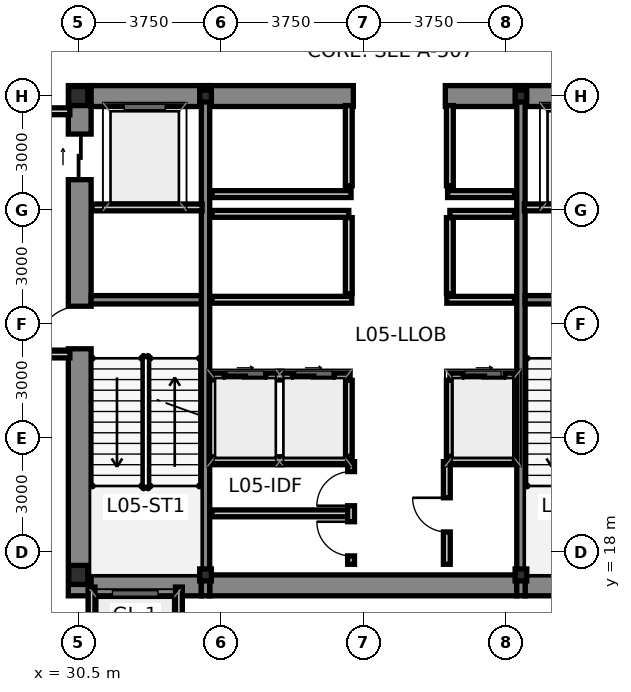
"""IFC4 building model, lengths in metres.
Left out: names, types, materials, properties, quantities, classifications, styles, units other than length and angle.
Written with IfcOpenShell. Run it as: python <this file> out.ifc"""

import sys

from ifc_helpers import new_model, si_unit, direction, frame, frame_2d, origin, origin_2d, place, context, subcontext, project, spatial, rectangle, i_section, extrude, source, transform, mapped, element, fill, save


model = new_model("IFC4")
c1 = context("Model", 3, precision=1e-05, world=origin(), true_north=direction((0.0, 1.0)))
c2 = subcontext(c1, "Body", "Model", "MODEL_VIEW")
j1 = project(units=[si_unit("LENGTHUNIT", "METRE"), si_unit("PLANEANGLEUNIT", "RADIAN")], contexts=[c1])
p1 = place(None, origin())
s1 = spatial("IfcSite", under=j1, at=p1, CompositionType="ELEMENT")
p2 = place(p1, origin())
s2 = spatial("IfcBuilding", under=s1, at=p2, CompositionType="ELEMENT")
p3 = place(p2, frame((0.0, 0.0, 23.1)))
s3 = spatial("IfcBuildingStorey", under=s2, at=p3, CompositionType="ELEMENT", Elevation=23.1)
m1 = source(origin(), c2, "Body", "SweptSolid", [
    extrude(i_section(OverallWidth=0.5, OverallDepth=0.5, WebThickness=0.028, FlangeThickness=0.04, at=origin_2d()), origin(), (0.0, 0.0, 1.0), 4.5),
])
for number, where, z_axis, x_axis in (
    (1, (30.5, 17.4, 0.0), (0.0, 0.0, 1.0), (1.0, 0.0, 0.0)),
    (2, (30.5, 30.0, 0.0), (0.0, 0.0, 1.0), (1.0, 0.0, 0.0)),
):
    element("IfcColumn", number, at=place(p3, frame(where, z_axis=z_axis, x_axis=x_axis)), inside=s3, PredefinedType="COLUMN", context=c2, shape_type="MappedRepresentation", body=[
        mapped(m1, transform((0.0, 0.0, 0.0), scale=1.0)),
    ])
m2 = source(origin(), c2, "Body", "SweptSolid", [
    extrude(i_section(OverallWidth=0.307, OverallDepth=0.315, WebThickness=0.012, FlangeThickness=0.019, at=origin_2d()), origin(), (0.0, 0.0, 1.0), 4.5),
])
for number, where, z_axis, x_axis in (
    (3, (33.85, 17.4, 0.0), (0.0, 0.0, 1.0), (1.0, 0.0, 0.0)),
    (4, (42.15, 17.4, 0.0), (0.0, 0.0, 1.0), (1.0, 0.0, 0.0)),
    (5, (33.85, 30.0, 0.0), (0.0, 0.0, 1.0), (1.0, 0.0, 0.0)),
    (6, (42.15, 30.0, 0.0), (0.0, 0.0, 1.0), (1.0, 0.0, 0.0)),
):
    element("IfcColumn", number, at=place(p3, frame(where, z_axis=z_axis, x_axis=x_axis)), inside=s3, PredefinedType="COLUMN", context=c2, shape_type="MappedRepresentation", body=[
        mapped(m2, transform((0.0, 0.0, 0.0), scale=1.0)),
    ])
p4 = place(p3, frame((30.54, 16.85, 0.0), z_axis=(0.0, 0.0, 1.0), x_axis=(0.0, 1.0, 0.0)))
e7 = element("IfcWall", 7, at=p4, inside=s3, PredefinedType="SHEAR", context=c2, shape_type="SweptSolid", body=[
    extrude(rectangle(XDim=13.425, YDim=0.6, at=frame_2d((6.712, 0.0))), origin(), (0.0, 0.0, 1.0), 4.5),
])
p5 = place(p4, frame((6.5, 0.0, 0.0)))
e8 = element("IfcOpeningElement", 8, at=p5, cuts=e7, PredefinedType="OPENING", context=c2, shape_type="SweptSolid", body=[
    extrude(rectangle(XDim=1.12, YDim=2.15, at=frame_2d((0.56, 1.075))), frame((0.0, 0.312, 0.0), z_axis=(0.0, -1.0, 0.0), x_axis=(1.0, 0.0, 0.0)), (0.0, 0.0, 1.0), 0.624),
])
p6 = place(p4, frame((10.95, 0.0, 0.0)))
e9 = element("IfcOpeningElement", 9, at=p6, cuts=e7, PredefinedType="OPENING", context=c2, shape_type="SweptSolid", body=[
    extrude(rectangle(XDim=1.2, YDim=2.2, at=frame_2d((0.6, 1.1))), frame((0.0, 0.312, 0.0), z_axis=(0.0, -1.0, 0.0), x_axis=(1.0, 0.0, 0.0)), (0.0, 0.0, 1.0), 0.624),
])
p7 = place(p3, frame((30.84, 17.125, 0.0), z_axis=(0.0, 0.0, 1.0), x_axis=(1.0, 0.0, 0.0)))
e10 = element("IfcWall", 10, at=p7, inside=s3, PredefinedType="SHEAR", context=c2, shape_type="SweptSolid", body=[
    extrude(rectangle(XDim=2.9, YDim=0.55, at=frame_2d((1.45, 0.0))), origin(), (0.0, 0.0, 1.0), 4.5),
])
p8 = place(p3, frame((33.96, 17.125, 0.0), z_axis=(0.0, 0.0, 1.0), x_axis=(1.0, 0.0, 0.0)))
e11 = element("IfcWall", 11, at=p8, inside=s3, PredefinedType="SHEAR", context=c2, shape_type="SweptSolid", body=[
    extrude(rectangle(XDim=8.08, YDim=0.55, at=frame_2d((4.04, 0.0))), origin(), (0.0, 0.0, 1.0), 4.5),
])
for number, where, z_axis, x_axis in (
    (12, (42.26, 17.125, 0.0), (0.0, 0.0, 1.0), (1.0, 0.0, 0.0)),
    (13, (30.84, 30.0, 0.0), (0.0, 0.0, 1.0), (1.0, 0.0, 0.0)),
):
    element("IfcWall", number, at=place(p3, frame(where, z_axis=z_axis, x_axis=x_axis)), inside=s3, PredefinedType="SHEAR", context=c2, shape_type="SweptSolid", body=[
        extrude(rectangle(XDim=2.9, YDim=0.55, at=frame_2d((1.45, 0.0))), origin(), (0.0, 0.0, 1.0), 4.5),
    ])
p9 = place(p3, frame((33.96, 30.0, 0.0), z_axis=(0.0, 0.0, 1.0), x_axis=(1.0, 0.0, 0.0)))
e14 = element("IfcWall", 14, at=p9, inside=s3, PredefinedType="SHEAR", context=c2, shape_type="SweptSolid", body=[
    extrude(rectangle(XDim=3.78, YDim=0.55, at=frame_2d((1.89, 0.0))), origin(), (0.0, 0.0, 1.0), 4.5),
])
p10 = place(p3, frame((40.16, 30.0, 0.0), z_axis=(0.0, 0.0, 1.0), x_axis=(1.0, 0.0, 0.0)))
e15 = element("IfcWall", 15, at=p10, inside=s3, PredefinedType="SHEAR", context=c2, shape_type="SweptSolid", body=[
    extrude(rectangle(XDim=1.88, YDim=0.55, at=frame_2d((0.94, 0.0))), origin(), (0.0, 0.0, 1.0), 4.5),
])
p11 = place(p3, frame((42.26, 30.0, 0.0), z_axis=(0.0, 0.0, 1.0), x_axis=(1.0, 0.0, 0.0)))
e16 = element("IfcWall", 16, at=p11, inside=s3, PredefinedType="SHEAR", context=c2, shape_type="SweptSolid", body=[
    extrude(rectangle(XDim=2.9, YDim=0.55, at=frame_2d((1.45, 0.0))), origin(), (0.0, 0.0, 1.0), 4.5),
])
for number, where, z_axis, x_axis in (
    (17, (33.85, 16.85, 0.0), (0.0, 0.0, 1.0), (0.0, 1.0, 0.0)),
    (18, (42.15, 16.85, 0.0), (0.0, 0.0, 1.0), (0.0, 1.0, 0.0)),
):
    element("IfcWall", number, at=place(p3, frame(where, z_axis=z_axis, x_axis=x_axis)), inside=s3, PredefinedType="SHEAR", context=c2, shape_type="SweptSolid", body=[
        extrude(rectangle(XDim=13.425, YDim=0.22, at=frame_2d((6.712, 0.0))), origin(), (0.0, 0.0, 1.0), 4.5),
    ])
for number, where, z_axis, x_axis in (
    (19, (30.84, 24.64, 0.0), (0.0, 0.0, 1.0), (1.0, 0.0, 0.0)),
    (20, (42.26, 24.64, 0.0), (0.0, 0.0, 1.0), (1.0, 0.0, 0.0)),
):
    element("IfcWall", number, at=place(p3, frame(where, z_axis=z_axis, x_axis=x_axis)), inside=s3, PredefinedType="SHEAR", context=c2, shape_type="SweptSolid", body=[
        extrude(rectangle(XDim=2.9, YDim=0.22, at=frame_2d((1.45, 0.0))), origin(), (0.0, 0.0, 1.0), 4.5),
    ])
p12 = place(p3, frame((30.85, 14.42, 0.0), z_axis=(0.0, 0.0, 1.0), x_axis=(0.0, 1.0, 0.0)))
e21 = element("IfcWall", 21, at=p12, inside=s3, PredefinedType="PARTITIONING", context=c2, shape_type="SweptSolid", body=[
    extrude(rectangle(XDim=2.66, YDim=0.18, at=frame_2d((1.33, 0.0))), origin(), (0.0, 0.0, 1.0), 3.623),
])
p13 = place(p3, frame((33.15, 14.42, 0.0), z_axis=(0.0, 0.0, 1.0), x_axis=(0.0, 1.0, 0.0)))
e22 = element("IfcWall", 22, at=p13, inside=s3, PredefinedType="PARTITIONING", context=c2, shape_type="SweptSolid", body=[
    extrude(rectangle(XDim=2.66, YDim=0.18, at=frame_2d((1.33, 0.0))), origin(), (0.0, 0.0, 1.0), 4.25),
])
p14 = place(p3, frame((34.02, 22.62, 0.0), z_axis=(0.0, 0.0, 1.0), x_axis=(1.0, 0.0, 0.0)))
e23 = element("IfcWall", 23, at=p14, inside=s3, PredefinedType="PARTITIONING", context=c2, shape_type="SweptSolid", body=[
    extrude(rectangle(XDim=3.6, YDim=0.18, at=frame_2d((1.8, 0.0))), origin(), (0.0, 0.0, 1.0), 4.25),
])
p15 = place(p14, frame((0.32, 0.0, 0.0)))
e24 = element("IfcOpeningElement", 24, at=p15, cuts=e23, PredefinedType="OPENING", context=c2, shape_type="SweptSolid", body=[
    extrude(rectangle(XDim=1.1, YDim=2.2, at=frame_2d((0.55, 1.1))), frame((0.0, 0.102, 0.0), z_axis=(0.0, -1.0, 0.0), x_axis=(1.0, 0.0, 0.0)), (0.0, 0.0, 1.0), 0.204),
])
p16 = place(p14, frame((2.12, 0.0, 0.0)))
e25 = element("IfcOpeningElement", 25, at=p16, cuts=e23, PredefinedType="OPENING", context=c2, shape_type="SweptSolid", body=[
    extrude(rectangle(XDim=1.1, YDim=2.2, at=frame_2d((0.55, 1.1))), frame((0.0, 0.102, 0.0), z_axis=(0.0, -1.0, 0.0), x_axis=(1.0, 0.0, 0.0)), (0.0, 0.0, 1.0), 0.204),
])
p17 = place(p3, frame((40.28, 22.62, 0.0), z_axis=(0.0, 0.0, 1.0), x_axis=(1.0, 0.0, 0.0)))
e26 = element("IfcWall", 26, at=p17, inside=s3, PredefinedType="PARTITIONING", context=c2, shape_type="SweptSolid", body=[
    extrude(rectangle(XDim=1.7, YDim=0.18, at=frame_2d((0.85, 0.0))), origin(), (0.0, 0.0, 1.0), 4.25),
])
p18 = place(p17, frame((0.35, 0.0, 0.0)))
e27 = element("IfcOpeningElement", 27, at=p18, cuts=e26, PredefinedType="OPENING", context=c2, shape_type="SweptSolid", body=[
    extrude(rectangle(XDim=1.1, YDim=2.2, at=frame_2d((0.55, 1.1))), frame((0.0, 0.102, 0.0), z_axis=(0.0, -1.0, 0.0), x_axis=(1.0, 0.0, 0.0)), (0.0, 0.0, 1.0), 0.204),
])
for number, where, z_axis, x_axis in (
    (28, (37.62, 20.52, 0.0), (0.0, 0.0, 1.0), (0.0, 1.0, 0.0)),
    (29, (40.28, 20.52, 0.0), (0.0, 0.0, 1.0), (0.0, 1.0, 0.0)),
):
    element("IfcWall", number, at=place(p3, frame(where, z_axis=z_axis, x_axis=x_axis)), inside=s3, PredefinedType="PARTITIONING", context=c2, shape_type="SweptSolid", body=[
        extrude(rectangle(XDim=2.0, YDim=0.18, at=frame_2d((1.0, 0.0))), origin(), (0.0, 0.0, 1.0), 4.25),
    ])
p19 = place(p3, frame((34.02, 26.9, 0.0), z_axis=(0.0, 0.0, 1.0), x_axis=(1.0, 0.0, 0.0)))
e30 = element("IfcWall", 30, at=p19, inside=s3, PredefinedType="PARTITIONING", context=c2, shape_type="SweptSolid", body=[
    extrude(rectangle(XDim=3.6, YDim=0.18, at=frame_2d((1.8, 0.0))), origin(), (0.0, 0.0, 1.0), 4.25),
])
p20 = place(p3, frame((40.28, 26.9, 0.0), z_axis=(0.0, 0.0, 1.0), x_axis=(1.0, 0.0, 0.0)))
e31 = element("IfcWall", 31, at=p20, inside=s3, PredefinedType="PARTITIONING", context=c2, shape_type="SweptSolid", body=[
    extrude(rectangle(XDim=1.7, YDim=0.18, at=frame_2d((0.85, 0.0))), origin(), (0.0, 0.0, 1.0), 4.25),
])
for number, where, z_axis, x_axis in (
    (32, (37.62, 24.8, 0.0), (0.0, 0.0, 1.0), (0.0, 1.0, 0.0)),
    (33, (40.28, 24.8, 0.0), (0.0, 0.0, 1.0), (0.0, 1.0, 0.0)),
):
    element("IfcWall", number, at=place(p3, frame(where, z_axis=z_axis, x_axis=x_axis)), inside=s3, PredefinedType="PARTITIONING", context=c2, shape_type="SweptSolid", body=[
        extrude(rectangle(XDim=2.0, YDim=0.18, at=frame_2d((1.0, 0.0))), origin(), (0.0, 0.0, 1.0), 4.25),
    ])
p21 = place(p3, frame((34.02, 24.64, 0.0), z_axis=(0.0, 0.0, 1.0), x_axis=(1.0, 0.0, 0.0)))
e34 = element("IfcWall", 34, at=p21, inside=s3, PredefinedType="PARTITIONING", context=c2, shape_type="SweptSolid", body=[
    extrude(rectangle(XDim=3.68, YDim=0.18, at=frame_2d((1.84, 0.0))), origin(), (0.0, 0.0, 1.0), 4.25),
])
p22 = place(p3, frame((40.2, 24.64, 0.0), z_axis=(0.0, 0.0, 1.0), x_axis=(1.0, 0.0, 0.0)))
e35 = element("IfcWall", 35, at=p22, inside=s3, PredefinedType="PARTITIONING", context=c2, shape_type="SweptSolid", body=[
    extrude(rectangle(XDim=1.78, YDim=0.18, at=frame_2d((0.89, 0.0))), origin(), (0.0, 0.0, 1.0), 4.25),
])
p23 = place(p3, frame((34.02, 27.42, 0.0), z_axis=(0.0, 0.0, 1.0), x_axis=(1.0, 0.0, 0.0)))
e36 = element("IfcWall", 36, at=p23, inside=s3, PredefinedType="PARTITIONING", context=c2, shape_type="SweptSolid", body=[
    extrude(rectangle(XDim=3.66, YDim=0.18, at=frame_2d((1.83, 0.0))), origin(), (0.0, 0.0, 1.0), 4.25),
])
p24 = place(p3, frame((40.22, 27.42, 0.0), z_axis=(0.0, 0.0, 1.0), x_axis=(1.0, 0.0, 0.0)))
e37 = element("IfcWall", 37, at=p24, inside=s3, PredefinedType="PARTITIONING", context=c2, shape_type="SweptSolid", body=[
    extrude(rectangle(XDim=1.76, YDim=0.18, at=frame_2d((0.88, 0.0))), origin(), (0.0, 0.0, 1.0), 4.25),
])
for number, where, z_axis, x_axis in (
    (38, (37.62, 27.64, 0.0), (0.0, 0.0, 1.0), (0.0, 1.0, 0.0)),
    (39, (40.28, 27.64, 0.0), (0.0, 0.0, 1.0), (0.0, 1.0, 0.0)),
):
    element("IfcWall", number, at=place(p3, frame(where, z_axis=z_axis, x_axis=x_axis)), inside=s3, PredefinedType="PARTITIONING", context=c2, shape_type="SweptSolid", body=[
        extrude(rectangle(XDim=2.11, YDim=0.18, at=frame_2d((1.055, 0.0))), origin(), (0.0, 0.0, 1.0), 4.25),
    ])
p25 = place(p3, frame((27.52, 23.2, 0.0), z_axis=(0.0, 0.0, 1.0), x_axis=(1.0, 0.0, 0.0)))
e40 = element("IfcWall", 40, at=p25, inside=s3, PredefinedType="PARTITIONING", context=c2, shape_type="SweptSolid", body=[
    extrude(rectangle(XDim=2.76, YDim=0.18, at=frame_2d((1.38, 0.0))), origin(), (0.0, 0.0, 1.0), 4.25),
])
p26 = place(p3, frame((27.52, 29.6, 0.0), z_axis=(0.0, 0.0, 1.0), x_axis=(1.0, 0.0, 0.0)))
e41 = element("IfcWall", 41, at=p26, inside=s3, PredefinedType="PARTITIONING", context=c2, shape_type="SweptSolid", body=[
    extrude(rectangle(XDim=2.76, YDim=0.18, at=frame_2d((1.38, 0.0))), origin(), (0.0, 0.0, 1.0), 3.035),
])
for number, where, z_axis, x_axis in (
    (42, (30.86, 27.07, 0.0), (0.0, 0.0, 1.0), (1.0, 0.0, 0.0)),
    (43, (42.24, 27.07, 0.0), (0.0, 0.0, 1.0), (1.0, 0.0, 0.0)),
):
    element("IfcWall", number, at=place(p3, frame(where, z_axis=z_axis, x_axis=x_axis)), inside=s3, PredefinedType="PARTITIONING", context=c2, shape_type="SweptSolid", body=[
        extrude(rectangle(XDim=2.9, YDim=0.18, at=frame_2d((1.45, 0.0))), origin(), (0.0, 0.0, 1.0), 4.25),
    ])
p27 = place(p3, frame((34.02, 20.42, 0.0), z_axis=(0.0, 0.0, 1.0), x_axis=(1.0, 0.0, 0.0)))
e44 = element("IfcWall", 44, at=p27, inside=s3, PredefinedType="PARTITIONING", context=c2, shape_type="SweptSolid", body=[
    extrude(rectangle(XDim=3.64, YDim=0.18, at=frame_2d((1.82, 0.0))), origin(), (0.0, 0.0, 1.0), 4.25),
])
p28 = place(p3, frame((40.22, 20.42, 0.0), z_axis=(0.0, 0.0, 1.0), x_axis=(1.0, 0.0, 0.0)))
e45 = element("IfcWall", 45, at=p28, inside=s3, PredefinedType="PARTITIONING", context=c2, shape_type="SweptSolid", body=[
    extrude(rectangle(XDim=1.76, YDim=0.18, at=frame_2d((0.88, 0.0))), origin(), (0.0, 0.0, 1.0), 4.25),
])
p29 = place(p3, frame((34.02, 19.02, 0.0), z_axis=(0.0, 0.0, 1.0), x_axis=(1.0, 0.0, 0.0)))
e46 = element("IfcWall", 46, at=p29, inside=s3, PredefinedType="PARTITIONING", context=c2, shape_type="SweptSolid", body=[
    extrude(rectangle(XDim=3.58, YDim=0.18, at=frame_2d((1.79, 0.0))), origin(), (0.0, 0.0, 1.0), 4.25),
])
p30 = place(p3, frame((37.68, 17.68, 0.0), z_axis=(0.0, 0.0, 1.0), x_axis=(0.0, 1.0, 0.0)))
e47 = element("IfcWall", 47, at=p30, inside=s3, PredefinedType="PARTITIONING", context=c2, shape_type="SweptSolid", body=[
    extrude(rectangle(XDim=2.7, YDim=0.18, at=frame_2d((1.35, 0.0))), origin(), (0.0, 0.0, 1.0), 4.25),
])
p31 = place(p30, frame((0.22, 0.0, 0.0)))
e48 = element("IfcOpeningElement", 48, at=p31, cuts=e47, PredefinedType="OPENING", context=c2, shape_type="SweptSolid", body=[
    extrude(rectangle(XDim=0.9, YDim=2.1, at=frame_2d((0.45, 1.05))), frame((0.0, 0.102, 0.0), z_axis=(0.0, -1.0, 0.0), x_axis=(1.0, 0.0, 0.0)), (0.0, 0.0, 1.0), 0.204),
])
p32 = place(p30, frame((1.54, 0.0, 0.0)))
e49 = element("IfcOpeningElement", 49, at=p32, cuts=e47, PredefinedType="OPENING", context=c2, shape_type="SweptSolid", body=[
    extrude(rectangle(XDim=0.9, YDim=2.1, at=frame_2d((0.45, 1.05))), frame((0.0, 0.102, 0.0), z_axis=(0.0, -1.0, 0.0), x_axis=(1.0, 0.0, 0.0)), (0.0, 0.0, 1.0), 0.204),
])
p33 = place(p3, frame((40.2, 17.68, 0.0), z_axis=(0.0, 0.0, 1.0), x_axis=(0.0, 1.0, 0.0)))
e50 = element("IfcWall", 50, at=p33, inside=s3, PredefinedType="PARTITIONING", context=c2, shape_type="SweptSolid", body=[
    extrude(rectangle(XDim=2.7, YDim=0.18, at=frame_2d((1.35, 0.0))), origin(), (0.0, 0.0, 1.0), 4.25),
])
p34 = place(p33, frame((0.85, 0.0, 0.0)))
e51 = element("IfcOpeningElement", 51, at=p34, cuts=e50, PredefinedType="OPENING", context=c2, shape_type="SweptSolid", body=[
    extrude(rectangle(XDim=0.9, YDim=2.1, at=frame_2d((0.45, 1.05))), frame((0.0, 0.102, 0.0), z_axis=(0.0, -1.0, 0.0), x_axis=(1.0, 0.0, 0.0)), (0.0, 0.0, 1.0), 0.204),
])
p35 = place(p5, origin())
e52 = element("IfcDoor", 52, at=p35, inside=s3, OperationType="SINGLE_SWING_LEFT", PredefinedType="DOOR", context=c2, shape_type="SweptSolid", body=[
    extrude(rectangle(XDim=1.12, YDim=2.15, at=frame_2d((0.56, 1.075))), frame((0.0, 0.025, 0.0), z_axis=(0.0, -1.0, 0.0), x_axis=(1.0, 0.0, 0.0)), (0.0, 0.0, 1.0), 0.05),
])
fill(e8, e52)
p36 = place(p6, origin())
e53 = element("IfcDoor", 53, at=p36, inside=s3, OperationType="SLIDING_TO_LEFT", PredefinedType="DOOR", context=c2, shape_type="SweptSolid", body=[
    extrude(rectangle(XDim=1.2, YDim=2.2, at=frame_2d((0.6, 1.1))), frame((0.0, 0.025, 0.0), z_axis=(0.0, -1.0, 0.0), x_axis=(1.0, 0.0, 0.0)), (0.0, 0.0, 1.0), 0.05),
])
fill(e9, e53)
p37 = place(p15, origin())
e54 = element("IfcDoor", 54, at=p37, inside=s3, OperationType="SLIDING_TO_LEFT", PredefinedType="DOOR", context=c2, shape_type="SweptSolid", body=[
    extrude(rectangle(XDim=1.1, YDim=2.2, at=frame_2d((0.55, 1.1))), frame((0.0, 0.025, 0.0), z_axis=(0.0, -1.0, 0.0), x_axis=(1.0, 0.0, 0.0)), (0.0, 0.0, 1.0), 0.05),
])
fill(e24, e54)
p38 = place(p16, origin())
e55 = element("IfcDoor", 55, at=p38, inside=s3, OperationType="SLIDING_TO_RIGHT", PredefinedType="DOOR", context=c2, shape_type="SweptSolid", body=[
    extrude(rectangle(XDim=1.1, YDim=2.2, at=frame_2d((0.55, 1.1))), frame((0.0, 0.025, 0.0), z_axis=(0.0, -1.0, 0.0), x_axis=(1.0, 0.0, 0.0)), (0.0, 0.0, 1.0), 0.05),
])
fill(e25, e55)
p39 = place(p18, origin())
e56 = element("IfcDoor", 56, at=p39, inside=s3, OperationType="SLIDING_TO_LEFT", PredefinedType="DOOR", context=c2, shape_type="SweptSolid", body=[
    extrude(rectangle(XDim=1.1, YDim=2.2, at=frame_2d((0.55, 1.1))), frame((0.0, 0.025, 0.0), z_axis=(0.0, -1.0, 0.0), x_axis=(1.0, 0.0, 0.0)), (0.0, 0.0, 1.0), 0.05),
])
fill(e27, e56)
p40 = place(p31, origin())
e57 = element("IfcDoor", 57, at=p40, inside=s3, OperationType="SINGLE_SWING_RIGHT", PredefinedType="DOOR", context=c2, shape_type="SweptSolid", body=[
    extrude(rectangle(XDim=0.9, YDim=2.1, at=frame_2d((0.45, 1.05))), frame((0.0, 0.025, 0.0), z_axis=(0.0, -1.0, 0.0), x_axis=(1.0, 0.0, 0.0)), (0.0, 0.0, 1.0), 0.05),
])
fill(e48, e57)
p41 = place(p32, origin())
e58 = element("IfcDoor", 58, at=p41, inside=s3, OperationType="SINGLE_SWING_LEFT", PredefinedType="DOOR", context=c2, shape_type="SweptSolid", body=[
    extrude(rectangle(XDim=0.9, YDim=2.1, at=frame_2d((0.45, 1.05))), frame((0.0, 0.025, 0.0), z_axis=(0.0, -1.0, 0.0), x_axis=(1.0, 0.0, 0.0)), (0.0, 0.0, 1.0), 0.05),
])
fill(e49, e58)
p42 = place(p34, origin())
e59 = element("IfcDoor", 59, at=p42, inside=s3, OperationType="SINGLE_SWING_RIGHT", PredefinedType="DOOR", context=c2, shape_type="SweptSolid", body=[
    extrude(rectangle(XDim=0.9, YDim=2.1, at=frame_2d((0.45, 1.05))), frame((0.0, 0.025, 0.0), z_axis=(0.0, -1.0, 0.0), x_axis=(1.0, 0.0, 0.0)), (0.0, 0.0, 1.0), 0.05),
])
fill(e51, e59)
save(model, sys.argv[1])
